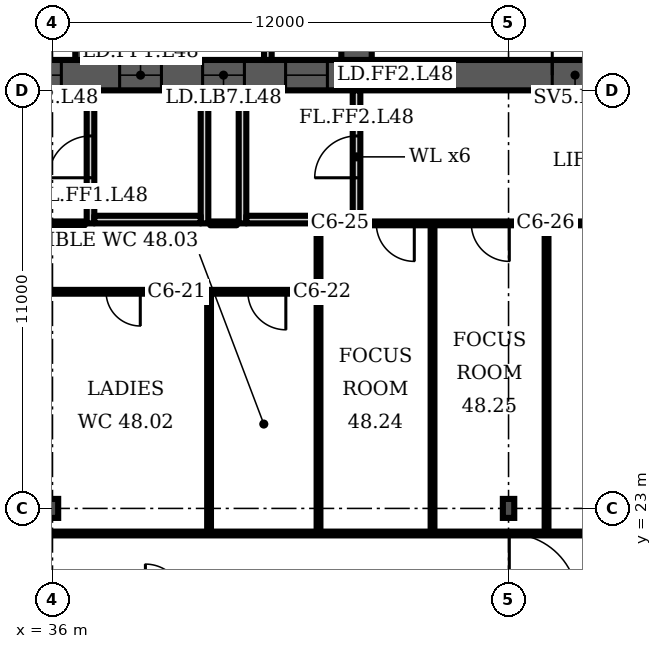
"""IFC4 building model, lengths in metres.
Left out: names, types, materials, properties, quantities, classifications, styles, units other than length and angle.
Written with IfcOpenShell. Run it as: python <this file> out.ifc"""

import sys

from ifc_helpers import new_model, si_unit, direction, frame, frame_2d, origin, origin_2d, place, context, subcontext, project, spatial, polyline, rectangle, i_section, outline, extrude, element, fill, save


model = new_model("IFC4")
c1 = context("Model", 3, precision=1e-05, world=origin(), true_north=direction((0.0, 1.0)))
c2 = subcontext(c1, "Body", "Model", "MODEL_VIEW")
j1 = project(units=[si_unit("LENGTHUNIT", "METRE"), si_unit("PLANEANGLEUNIT", "RADIAN")], contexts=[c1])
p1 = place(None, origin())
s1 = spatial("IfcSite", under=j1, at=p1, CompositionType="ELEMENT")
p2 = place(p1, origin())
s2 = spatial("IfcBuilding", under=s1, at=p2, CompositionType="ELEMENT")
p3 = place(p2, frame((0.0, 0.0, 195.1)))
s3 = spatial("IfcBuildingStorey", under=s2, at=p3, CompositionType="ELEMENT", Elevation=195.1)
p4 = place(p3, frame((16.0, 34.4, 0.0), z_axis=(0.0, 0.0, 1.0), x_axis=(1.0, 0.0, 0.0)))
e1 = element("IfcWall", 1, at=p4, inside=s3, PredefinedType="SHEAR", context=c2, shape_type="SweptSolid", body=[
    extrude(rectangle(XDim=42.0, YDim=0.8, at=frame_2d((21.0, 0.0))), origin(), (0.0, 0.0, 1.0), 3.6),
])
p5 = place(p4, frame((3.2, 0.0, 0.0)))
e2 = element("IfcOpeningElement", 2, at=p5, cuts=e1, PredefinedType="OPENING", context=c2, shape_type="SweptSolid", body=[
    extrude(rectangle(XDim=1.0, YDim=2.1, at=frame_2d((0.5, 1.05))), frame((0.0, 0.41, 0.0), z_axis=(0.0, -1.0, 0.0), x_axis=(1.0, 0.0, 0.0)), (0.0, 0.0, 1.0), 0.82),
])
p6 = place(p4, frame((7.65, 0.0, 0.0)))
e3 = element("IfcOpeningElement", 3, at=p6, cuts=e1, PredefinedType="OPENING", context=c2, shape_type="SweptSolid", body=[
    extrude(rectangle(XDim=1.2, YDim=2.1, at=frame_2d((0.6, 1.05))), frame((0.0, 0.41, 0.0), z_axis=(0.0, -1.0, 0.0), x_axis=(1.0, 0.0, 0.0)), (0.0, 0.0, 1.0), 0.82),
])
p7 = place(p4, frame((14.767, 0.0, 0.0)))
e4 = element("IfcOpeningElement", 4, at=p7, cuts=e1, PredefinedType="OPENING", context=c2, shape_type="SweptSolid", body=[
    extrude(rectangle(XDim=1.1, YDim=2.1, at=frame_2d((0.55, 1.05))), frame((0.0, 0.41, 0.0), z_axis=(0.0, -1.0, 0.0), x_axis=(1.0, 0.0, 0.0)), (0.0, 0.0, 1.0), 0.82),
])
p8 = place(p4, frame((19.133, 0.0, 0.0)))
e5 = element("IfcOpeningElement", 5, at=p8, cuts=e1, PredefinedType="OPENING", context=c2, shape_type="SweptSolid", body=[
    extrude(rectangle(XDim=1.1, YDim=2.1, at=frame_2d((0.55, 1.05))), frame((0.0, 0.41, 0.0), z_axis=(0.0, -1.0, 0.0), x_axis=(1.0, 0.0, 0.0)), (0.0, 0.0, 1.0), 0.82),
])
p9 = place(p4, frame((16.8, 0.0, 0.0)))
e6 = element("IfcOpeningElement", 6, at=p9, cuts=e1, PredefinedType="OPENING", context=c2, shape_type="SweptSolid", body=[
    extrude(rectangle(XDim=1.4, YDim=2.1, at=frame_2d((0.7, 1.05))), frame((0.0, 0.41, 0.0), z_axis=(0.0, -1.0, 0.0), x_axis=(1.0, 0.0, 0.0)), (0.0, 0.0, 1.0), 0.82),
])
p10 = place(p4, frame((21.767, 0.0, 0.0)))
e7 = element("IfcOpeningElement", 7, at=p10, cuts=e1, PredefinedType="OPENING", context=c2, shape_type="SweptSolid", body=[
    extrude(rectangle(XDim=1.1, YDim=2.1, at=frame_2d((0.55, 1.05))), frame((0.0, 0.41, 0.0), z_axis=(0.0, -1.0, 0.0), x_axis=(1.0, 0.0, 0.0)), (0.0, 0.0, 1.0), 0.82),
])
p11 = place(p4, frame((23.95, 0.0, 0.0)))
e8 = element("IfcOpeningElement", 8, at=p11, cuts=e1, PredefinedType="OPENING", context=c2, shape_type="SweptSolid", body=[
    extrude(rectangle(XDim=1.1, YDim=2.1, at=frame_2d((0.55, 1.05))), frame((0.0, 0.41, 0.0), z_axis=(0.0, -1.0, 0.0), x_axis=(1.0, 0.0, 0.0)), (0.0, 0.0, 1.0), 0.82),
])
p12 = place(p4, frame((26.133, 0.0, 0.0)))
e9 = element("IfcOpeningElement", 9, at=p12, cuts=e1, PredefinedType="OPENING", context=c2, shape_type="SweptSolid", body=[
    extrude(rectangle(XDim=1.1, YDim=2.1, at=frame_2d((0.55, 1.05))), frame((0.0, 0.41, 0.0), z_axis=(0.0, -1.0, 0.0), x_axis=(1.0, 0.0, 0.0)), (0.0, 0.0, 1.0), 0.82),
])
p13 = place(p4, frame((33.15, 0.0, 0.0)))
e10 = element("IfcOpeningElement", 10, at=p13, cuts=e1, PredefinedType="OPENING", context=c2, shape_type="SweptSolid", body=[
    extrude(rectangle(XDim=1.2, YDim=2.1, at=frame_2d((0.6, 1.05))), frame((0.0, 0.41, 0.0), z_axis=(0.0, -1.0, 0.0), x_axis=(1.0, 0.0, 0.0)), (0.0, 0.0, 1.0), 0.82),
])
p14 = place(p4, frame((35.817, 0.0, 0.0)))
e11 = element("IfcOpeningElement", 11, at=p14, cuts=e1, PredefinedType="OPENING", context=c2, shape_type="SweptSolid", body=[
    extrude(rectangle(XDim=1.0, YDim=2.1, at=frame_2d((0.5, 1.05))), frame((0.0, 0.41, 0.0), z_axis=(0.0, -1.0, 0.0), x_axis=(1.0, 0.0, 0.0)), (0.0, 0.0, 1.0), 0.82),
])
p15 = place(p4, frame((39.95, 0.0, 0.0)))
e12 = element("IfcOpeningElement", 12, at=p15, cuts=e1, PredefinedType="OPENING", context=c2, shape_type="SweptSolid", body=[
    extrude(rectangle(XDim=1.0, YDim=2.1, at=frame_2d((0.5, 1.05))), frame((0.0, 0.41, 0.0), z_axis=(0.0, -1.0, 0.0), x_axis=(1.0, 0.0, 0.0)), (0.0, 0.0, 1.0), 0.82),
])
p16 = place(p4, frame((37.767, 0.0, 0.0)))
e13 = element("IfcOpeningElement", 13, at=p16, cuts=e1, PredefinedType="OPENING", context=c2, shape_type="SweptSolid", body=[
    extrude(rectangle(XDim=1.4, YDim=2.1, at=frame_2d((0.7, 1.05))), frame((0.0, 0.41, 0.0), z_axis=(0.0, -1.0, 0.0), x_axis=(1.0, 0.0, 0.0)), (0.0, 0.0, 1.0), 0.82),
])
p17 = place(p3, frame((37.0, 34.8, 0.0), z_axis=(0.0, 0.0, 1.0), x_axis=(0.0, 1.0, 0.0)))
e14 = element("IfcWall", 14, at=p17, inside=s3, PredefinedType="SHEAR", context=c2, shape_type="SweptSolid", body=[
    extrude(rectangle(XDim=14.987, YDim=0.8, at=frame_2d((7.493, 0.0))), origin(), (0.0, 0.0, 1.0), 3.6),
])
p18 = place(p17, frame((11.312, 0.0, 0.0)))
e15 = element("IfcOpeningElement", 15, at=p18, cuts=e14, PredefinedType="OPENING", context=c2, shape_type="SweptSolid", body=[
    extrude(rectangle(XDim=1.0, YDim=2.1, at=frame_2d((0.5, 1.05))), frame((0.0, 0.41, 0.0), z_axis=(0.0, -1.0, 0.0), x_axis=(1.0, 0.0, 0.0)), (0.0, 0.0, 1.0), 0.82),
])
p19 = place(p17, frame((3.6, 0.0, 0.0)))
e16 = element("IfcOpeningElement", 16, at=p19, cuts=e14, PredefinedType="OPENING", context=c2, shape_type="SweptSolid", body=[
    extrude(rectangle(XDim=1.1, YDim=2.1, at=frame_2d((0.55, 1.05))), frame((0.0, 0.41, 0.0), z_axis=(0.0, -1.0, 0.0), x_axis=(1.0, 0.0, 0.0)), (0.0, 0.0, 1.0), 0.82),
])
p20 = place(p3, frame((44.0, 34.8, 0.0), z_axis=(0.0, 0.0, 1.0), x_axis=(0.0, 1.0, 0.0)))
e17 = element("IfcWall", 17, at=p20, inside=s3, PredefinedType="SHEAR", context=c2, shape_type="SweptSolid", body=[
    extrude(rectangle(XDim=14.374, YDim=0.8, at=frame_2d((7.187, 0.0))), origin(), (0.0, 0.0, 1.0), 3.6),
])
p21 = place(p20, frame((11.312, 0.0, 0.0)))
e18 = element("IfcOpeningElement", 18, at=p21, cuts=e17, PredefinedType="OPENING", context=c2, shape_type="SweptSolid", body=[
    extrude(rectangle(XDim=1.0, YDim=2.1, at=frame_2d((0.5, 1.05))), frame((0.0, 0.41, 0.0), z_axis=(0.0, -1.0, 0.0), x_axis=(1.0, 0.0, 0.0)), (0.0, 0.0, 1.0), 0.82),
])
p22 = place(p20, frame((3.6, 0.0, 0.0)))
e19 = element("IfcOpeningElement", 19, at=p22, cuts=e17, PredefinedType="OPENING", context=c2, shape_type="SweptSolid", body=[
    extrude(rectangle(XDim=1.1, YDim=2.1, at=frame_2d((0.55, 1.05))), frame((0.0, 0.41, 0.0), z_axis=(0.0, -1.0, 0.0), x_axis=(1.0, 0.0, 0.0)), (0.0, 0.0, 1.0), 0.82),
])
for number, where, z_axis, x_axis in (
    (20, (36.0, 23.0, 0.0), (0.0, 0.0, 1.0), (1.0, 0.0, 0.0)),
    (21, (48.0, 23.0, 0.0), (0.0, 0.0, 1.0), (1.0, 0.0, 0.0)),
):
    element("IfcColumn", number, at=place(p3, frame(where, z_axis=z_axis, x_axis=x_axis)), inside=s3, PredefinedType="COLUMN", context=c2, shape_type="SweptSolid", body=[
        extrude(i_section(OverallWidth=0.3, OverallDepth=0.5, WebThickness=0.014, FlangeThickness=0.028, FilletRadius=0.027, at=origin_2d()), origin(), (0.0, 0.0, 1.0), 3.6),
    ])
p23 = place(p3, frame((0.0, 0.0, -0.0)))
e22 = element("IfcWall", 22, at=p23, inside=s3, PredefinedType="PARTITIONING", context=c2, shape_type="SweptSolid", body=[
    extrude(outline(polyline([(34.567, 37.85), (34.767, 37.85), (36.6, 37.85), (36.6, 37.65), (34.767, 37.65), (34.767, 34.8), (34.567, 34.8), (34.567, 37.85)])), origin(), (0.0, 0.0, 1.0), 3.2),
])
p24 = place(p3, frame((0.0, 0.0, -0.0)))
e23 = element("IfcWall", 23, at=p24, inside=s3, PredefinedType="PARTITIONING", context=c2, shape_type="SweptSolid", body=[
    extrude(outline(polyline([(41.567, 37.1), (39.433, 37.1), (39.433, 34.8), (39.233, 34.8), (39.233, 37.65), (37.4, 37.65), (37.4, 37.85), (39.233, 37.85), (39.433, 37.85), (39.433, 37.3), (41.567, 37.3), (41.567, 37.55), (41.767, 37.55), (43.6, 37.55), (43.6, 37.35), (41.767, 37.35), (41.767, 34.8), (41.567, 34.8), (41.567, 37.1)])), origin(), (0.0, 0.0, 1.0), 3.2),
])
p25 = place(p3, frame((37.0, 30.5, 0.0), z_axis=(0.0, 0.0, 1.0), x_axis=(0.0, 1.0, 0.0)))
e24 = element("IfcWall", 24, at=p25, inside=s3, PredefinedType="PARTITIONING", context=c2, shape_type="SweptSolid", body=[
    extrude(rectangle(XDim=3.5, YDim=0.2, at=frame_2d((1.75, 0.0))), origin(), (0.0, 0.0, 1.0), 3.2),
])
p26 = place(p25, frame((1.2, 0.0, 0.0)))
e25 = element("IfcOpeningElement", 25, at=p26, cuts=e24, PredefinedType="OPENING", context=c2, shape_type="SweptSolid", body=[
    extrude(rectangle(XDim=1.1, YDim=2.1, at=frame_2d((0.55, 1.05))), frame((0.0, 0.11, 0.0), z_axis=(0.0, -1.0, 0.0), x_axis=(1.0, 0.0, 0.0)), (0.0, 0.0, 1.0), 0.22),
])
p27 = place(p3, frame((40.0, 30.5, 0.0), z_axis=(0.0, 0.0, 1.0), x_axis=(0.0, 1.0, 0.0)))
e26 = element("IfcWall", 26, at=p27, inside=s3, PredefinedType="PARTITIONING", context=c2, shape_type="SweptSolid", body=[
    extrude(rectangle(XDim=3.5, YDim=0.2, at=frame_2d((1.75, 0.0))), origin(), (0.0, 0.0, 1.0), 3.2),
])
p28 = place(p3, frame((37.1, 30.6, 0.0), z_axis=(0.0, 0.0, 1.0), x_axis=(1.0, 0.0, 0.0)))
e27 = element("IfcWall", 27, at=p28, inside=s3, PredefinedType="PARTITIONING", context=c2, shape_type="SweptSolid", body=[
    extrude(rectangle(XDim=2.8, YDim=0.2, at=frame_2d((1.4, 0.0))), origin(), (0.0, 0.0, 1.0), 3.2),
])
p29 = place(p3, frame((41.0, 30.5, 0.0), z_axis=(0.0, 0.0, 1.0), x_axis=(0.0, 1.0, 0.0)))
e28 = element("IfcWall", 28, at=p29, inside=s3, PredefinedType="PARTITIONING", context=c2, shape_type="SweptSolid", body=[
    extrude(rectangle(XDim=3.5, YDim=0.2, at=frame_2d((1.75, 0.0))), origin(), (0.0, 0.0, 1.0), 3.2),
])
p30 = place(p3, frame((44.0, 30.5, 0.0), z_axis=(0.0, 0.0, 1.0), x_axis=(0.0, 1.0, 0.0)))
e29 = element("IfcWall", 29, at=p30, inside=s3, PredefinedType="PARTITIONING", context=c2, shape_type="SweptSolid", body=[
    extrude(rectangle(XDim=3.5, YDim=0.2, at=frame_2d((1.75, 0.0))), origin(), (0.0, 0.0, 1.0), 3.2),
])
p31 = place(p30, frame((1.2, 0.0, 0.0)))
e30 = element("IfcOpeningElement", 30, at=p31, cuts=e29, PredefinedType="OPENING", context=c2, shape_type="SweptSolid", body=[
    extrude(rectangle(XDim=1.1, YDim=2.1, at=frame_2d((0.55, 1.05))), frame((0.0, 0.11, 0.0), z_axis=(0.0, -1.0, 0.0), x_axis=(1.0, 0.0, 0.0)), (0.0, 0.0, 1.0), 0.22),
])
p32 = place(p3, frame((41.1, 30.6, 0.0), z_axis=(0.0, 0.0, 1.0), x_axis=(1.0, 0.0, 0.0)))
e31 = element("IfcWall", 31, at=p32, inside=s3, PredefinedType="PARTITIONING", context=c2, shape_type="SweptSolid", body=[
    extrude(rectangle(XDim=2.8, YDim=0.2, at=frame_2d((1.4, 0.0))), origin(), (0.0, 0.0, 1.0), 3.2),
])
p33 = place(p3, frame((18.2, 30.5, 0.0), z_axis=(0.0, 0.0, 1.0), x_axis=(1.0, 0.0, 0.0)))
e32 = element("IfcWall", 32, at=p33, inside=s3, PredefinedType="PARTITIONING", context=c2, shape_type="SweptSolid", body=[
    extrude(rectangle(XDim=18.65, YDim=0.1, at=frame_2d((9.325, 0.0))), origin(), (0.0, 0.0, 1.0), 3.2),
])
p34 = place(p33, frame((0.74, 0.0, 0.0)))
e33 = element("IfcOpeningElement", 33, at=p34, cuts=e32, PredefinedType="OPENING", context=c2, shape_type="SweptSolid", body=[
    extrude(rectangle(XDim=1.0, YDim=2.1, at=frame_2d((0.5, 1.05))), frame((0.0, 0.06, 0.0), z_axis=(0.0, -1.0, 0.0), x_axis=(1.0, 0.0, 0.0)), (0.0, 0.0, 1.0), 0.12),
])
p35 = place(p3, frame((18.955, 22.34, 0.0), z_axis=(0.0, 0.0, 1.0), x_axis=(1.0, 0.0, 0.0)))
e34 = element("IfcWall", 34, at=p35, inside=s3, PredefinedType="PARTITIONING", context=c2, shape_type="SweptSolid", body=[
    extrude(rectangle(XDim=42.555, YDim=0.1, at=frame_2d((21.277, 0.0))), origin(), (0.0, 0.0, 1.0), 3.2),
])
p36 = place(p35, frame((0.62, 0.0, 0.0)))
e35 = element("IfcOpeningElement", 35, at=p36, cuts=e34, PredefinedType="OPENING", context=c2, shape_type="SweptSolid", body=[
    extrude(rectangle(XDim=1.0, YDim=2.1, at=frame_2d((0.5, 1.05))), frame((0.0, 0.06, 0.0), z_axis=(0.0, -1.0, 0.0), x_axis=(1.0, 0.0, 0.0)), (0.0, 0.0, 1.0), 0.12),
])
p37 = place(p35, frame((8.62, 0.0, 0.0)))
e36 = element("IfcOpeningElement", 36, at=p37, cuts=e34, PredefinedType="OPENING", context=c2, shape_type="SweptSolid", body=[
    extrude(rectangle(XDim=1.0, YDim=2.1, at=frame_2d((0.5, 1.05))), frame((0.0, 0.06, 0.0), z_axis=(0.0, -1.0, 0.0), x_axis=(1.0, 0.0, 0.0)), (0.0, 0.0, 1.0), 0.12),
])
p38 = place(p3, frame((31.0, 28.7, 0.0), z_axis=(0.0, 0.0, 1.0), x_axis=(1.0, 0.0, 0.0)))
e37 = element("IfcWall", 37, at=p38, inside=s3, PredefinedType="PARTITIONING", context=c2, shape_type="SweptSolid", body=[
    extrude(rectangle(XDim=12.0, YDim=0.1, at=frame_2d((6.0, 0.0))), origin(), (0.0, 0.0, 1.0), 3.2),
])
p39 = place(p38, frame((1.87, 0.0, 0.0)))
e38 = element("IfcOpeningElement", 38, at=p39, cuts=e37, PredefinedType="OPENING", context=c2, shape_type="SweptSolid", body=[
    extrude(rectangle(XDim=0.9, YDim=2.1, at=frame_2d((0.45, 1.05))), frame((0.0, 0.06, 0.0), z_axis=(0.0, -1.0, 0.0), x_axis=(1.0, 0.0, 0.0)), (0.0, 0.0, 1.0), 0.12),
])
p40 = place(p38, frame((6.41, 0.0, 0.0)))
e39 = element("IfcOpeningElement", 39, at=p40, cuts=e37, PredefinedType="OPENING", context=c2, shape_type="SweptSolid", body=[
    extrude(rectangle(XDim=0.9, YDim=2.1, at=frame_2d((0.45, 1.05))), frame((0.0, 0.06, 0.0), z_axis=(0.0, -1.0, 0.0), x_axis=(1.0, 0.0, 0.0)), (0.0, 0.0, 1.0), 0.12),
])
p41 = place(p38, frame((10.14, 0.0, 0.0)))
e40 = element("IfcOpeningElement", 40, at=p41, cuts=e37, PredefinedType="OPENING", context=c2, shape_type="SweptSolid", body=[
    extrude(rectangle(XDim=1.0, YDim=2.1, at=frame_2d((0.5, 1.05))), frame((0.0, 0.06, 0.0), z_axis=(0.0, -1.0, 0.0), x_axis=(1.0, 0.0, 0.0)), (0.0, 0.0, 1.0), 0.12),
])
p42 = place(p3, frame((40.12, 22.34, 0.0), z_axis=(0.0, 0.0, 1.0), x_axis=(0.0, 1.0, 0.0)))
e41 = element("IfcWall", 41, at=p42, inside=s3, PredefinedType="PARTITIONING", context=c2, shape_type="SweptSolid", body=[
    extrude(rectangle(XDim=6.36, YDim=0.1, at=frame_2d((3.18, 0.0))), origin(), (0.0, 0.0, 1.0), 3.2),
])
p43 = place(p3, frame((43.0, 22.34, 0.0), z_axis=(0.0, 0.0, 1.0), x_axis=(0.0, 1.0, 0.0)))
e42 = element("IfcWall", 42, at=p43, inside=s3, PredefinedType="PARTITIONING", context=c2, shape_type="SweptSolid", body=[
    extrude(rectangle(XDim=8.15, YDim=0.1, at=frame_2d((4.075, 0.0))), origin(), (0.0, 0.0, 1.0), 3.2),
])
for number, where, z_axis, x_axis in (
    (43, (46.0, 22.34, 0.0), (0.0, 0.0, 1.0), (0.0, 1.0, 0.0)),
    (44, (49.0, 22.34, 0.0), (0.0, 0.0, 1.0), (0.0, 1.0, 0.0)),
):
    element("IfcWall", number, at=place(p3, frame(where, z_axis=z_axis, x_axis=x_axis)), inside=s3, PredefinedType="PARTITIONING", context=c2, shape_type="SweptSolid", body=[
        extrude(rectangle(XDim=8.16, YDim=0.1, at=frame_2d((4.08, 0.0))), origin(), (0.0, 0.0, 1.0), 3.2),
    ])
p44 = place(p3, frame((40.15, 30.5, 0.0), z_axis=(0.0, 0.0, 1.0), x_axis=(1.0, 0.0, 0.0)))
e45 = element("IfcWall", 45, at=p44, inside=s3, PredefinedType="PARTITIONING", context=c2, shape_type="SweptSolid", body=[
    extrude(rectangle(XDim=0.7, YDim=0.1, at=frame_2d((0.35, 0.0))), origin(), (0.0, 0.0, 1.0), 3.2),
])
p45 = place(p3, frame((44.15, 30.5, 0.0), z_axis=(0.0, 0.0, 1.0), x_axis=(1.0, 0.0, 0.0)))
e46 = element("IfcWall", 46, at=p45, inside=s3, PredefinedType="PARTITIONING", context=c2, shape_type="SweptSolid", body=[
    extrude(rectangle(XDim=13.85, YDim=0.1, at=frame_2d((6.925, 0.0))), origin(), (0.0, 0.0, 1.0), 3.2),
])
p46 = place(p45, frame((0.37, 0.0, 0.0)))
e47 = element("IfcOpeningElement", 47, at=p46, cuts=e46, PredefinedType="OPENING", context=c2, shape_type="SweptSolid", body=[
    extrude(rectangle(XDim=1.0, YDim=2.1, at=frame_2d((0.5, 1.05))), frame((0.0, 0.06, 0.0), z_axis=(0.0, -1.0, 0.0), x_axis=(1.0, 0.0, 0.0)), (0.0, 0.0, 1.0), 0.12),
])
p47 = place(p45, frame((2.87, 0.0, 0.0)))
e48 = element("IfcOpeningElement", 48, at=p47, cuts=e46, PredefinedType="OPENING", context=c2, shape_type="SweptSolid", body=[
    extrude(rectangle(XDim=1.0, YDim=2.1, at=frame_2d((0.5, 1.05))), frame((0.0, 0.06, 0.0), z_axis=(0.0, -1.0, 0.0), x_axis=(1.0, 0.0, 0.0)), (0.0, 0.0, 1.0), 0.12),
])
p48 = place(p45, frame((10.67, 0.0, 0.0)))
e49 = element("IfcOpeningElement", 49, at=p48, cuts=e46, PredefinedType="OPENING", context=c2, shape_type="SweptSolid", body=[
    extrude(rectangle(XDim=1.0, YDim=2.1, at=frame_2d((0.5, 1.05))), frame((0.0, 0.06, 0.0), z_axis=(0.0, -1.0, 0.0), x_axis=(1.0, 0.0, 0.0)), (0.0, 0.0, 1.0), 0.12),
])
p49 = place(p8, origin())
e50 = element("IfcDoor", 50, at=p49, inside=s3, OperationType="DOUBLE_DOOR_SLIDING", PredefinedType="DOOR", context=c2, shape_type="SweptSolid", body=[
    extrude(rectangle(XDim=1.1, YDim=2.1, at=frame_2d((0.55, 1.05))), frame((0.0, 0.025, 0.0), z_axis=(0.0, -1.0, 0.0), x_axis=(1.0, 0.0, 0.0)), (0.0, 0.0, 1.0), 0.05),
])
fill(e5, e50)
p50 = place(p10, origin())
e51 = element("IfcDoor", 51, at=p50, inside=s3, OperationType="DOUBLE_DOOR_SLIDING", PredefinedType="DOOR", context=c2, shape_type="SweptSolid", body=[
    extrude(rectangle(XDim=1.1, YDim=2.1, at=frame_2d((0.55, 1.05))), frame((0.0, 0.025, 0.0), z_axis=(0.0, -1.0, 0.0), x_axis=(1.0, 0.0, 0.0)), (0.0, 0.0, 1.0), 0.05),
])
fill(e7, e51)
p51 = place(p11, origin())
e52 = element("IfcDoor", 52, at=p51, inside=s3, OperationType="DOUBLE_DOOR_SLIDING", PredefinedType="DOOR", context=c2, shape_type="SweptSolid", body=[
    extrude(rectangle(XDim=1.1, YDim=2.1, at=frame_2d((0.55, 1.05))), frame((0.0, 0.025, 0.0), z_axis=(0.0, -1.0, 0.0), x_axis=(1.0, 0.0, 0.0)), (0.0, 0.0, 1.0), 0.05),
])
fill(e8, e52)
p52 = place(p12, origin())
e53 = element("IfcDoor", 53, at=p52, inside=s3, OperationType="DOUBLE_DOOR_SLIDING", PredefinedType="DOOR", context=c2, shape_type="SweptSolid", body=[
    extrude(rectangle(XDim=1.1, YDim=2.1, at=frame_2d((0.55, 1.05))), frame((0.0, 0.025, 0.0), z_axis=(0.0, -1.0, 0.0), x_axis=(1.0, 0.0, 0.0)), (0.0, 0.0, 1.0), 0.05),
])
fill(e9, e53)
p53 = place(p13, origin())
e54 = element("IfcDoor", 54, at=p53, inside=s3, OperationType="SINGLE_SWING_LEFT", PredefinedType="DOOR", context=c2, shape_type="SweptSolid", body=[
    extrude(rectangle(XDim=1.2, YDim=2.1, at=frame_2d((0.6, 1.05))), frame((0.0, 0.025, 0.0), z_axis=(0.0, -1.0, 0.0), x_axis=(1.0, 0.0, 0.0)), (0.0, 0.0, 1.0), 0.05),
])
fill(e10, e54)
p54 = place(p26, origin())
e55 = element("IfcDoor", 55, at=p54, inside=s3, OperationType="SINGLE_SWING_LEFT", PredefinedType="DOOR", context=c2, shape_type="SweptSolid", body=[
    extrude(rectangle(XDim=1.1, YDim=2.1, at=frame_2d((0.55, 1.05))), frame((0.0, 0.025, 0.0), z_axis=(0.0, -1.0, 0.0), x_axis=(1.0, 0.0, 0.0)), (0.0, 0.0, 1.0), 0.05),
])
fill(e25, e55)
p55 = place(p31, origin())
e56 = element("IfcDoor", 56, at=p55, inside=s3, OperationType="SINGLE_SWING_LEFT", PredefinedType="DOOR", context=c2, shape_type="SweptSolid", body=[
    extrude(rectangle(XDim=1.1, YDim=2.1, at=frame_2d((0.55, 1.05))), frame((0.0, 0.025, 0.0), z_axis=(0.0, -1.0, 0.0), x_axis=(1.0, 0.0, 0.0)), (0.0, 0.0, 1.0), 0.05),
])
fill(e30, e56)
p56 = place(p40, origin())
e57 = element("IfcDoor", 57, at=p56, inside=s3, OperationType="SINGLE_SWING_RIGHT", PredefinedType="DOOR", context=c2, shape_type="SweptSolid", body=[
    extrude(rectangle(XDim=0.9, YDim=2.1, at=frame_2d((0.45, 1.05))), frame((0.0, 0.025, 0.0), z_axis=(0.0, -1.0, 0.0), x_axis=(1.0, 0.0, 0.0)), (0.0, 0.0, 1.0), 0.05),
])
fill(e39, e57)
p57 = place(p41, origin())
e58 = element("IfcDoor", 58, at=p57, inside=s3, OperationType="SINGLE_SWING_RIGHT", PredefinedType="DOOR", context=c2, shape_type="SweptSolid", body=[
    extrude(rectangle(XDim=1.0, YDim=2.1, at=frame_2d((0.5, 1.05))), frame((0.0, 0.025, 0.0), z_axis=(0.0, -1.0, 0.0), x_axis=(1.0, 0.0, 0.0)), (0.0, 0.0, 1.0), 0.05),
])
fill(e40, e58)
p58 = place(p46, origin())
e59 = element("IfcDoor", 59, at=p58, inside=s3, OperationType="SINGLE_SWING_RIGHT", PredefinedType="DOOR", context=c2, shape_type="SweptSolid", body=[
    extrude(rectangle(XDim=1.0, YDim=2.1, at=frame_2d((0.5, 1.05))), frame((0.0, 0.025, 0.0), z_axis=(0.0, -1.0, 0.0), x_axis=(1.0, 0.0, 0.0)), (0.0, 0.0, 1.0), 0.05),
])
fill(e47, e59)
p59 = place(p47, origin())
e60 = element("IfcDoor", 60, at=p59, inside=s3, OperationType="SINGLE_SWING_RIGHT", PredefinedType="DOOR", context=c2, shape_type="SweptSolid", body=[
    extrude(rectangle(XDim=1.0, YDim=2.1, at=frame_2d((0.5, 1.05))), frame((0.0, 0.025, 0.0), z_axis=(0.0, -1.0, 0.0), x_axis=(1.0, 0.0, 0.0)), (0.0, 0.0, 1.0), 0.05),
])
fill(e48, e60)
save(model, sys.argv[1])
